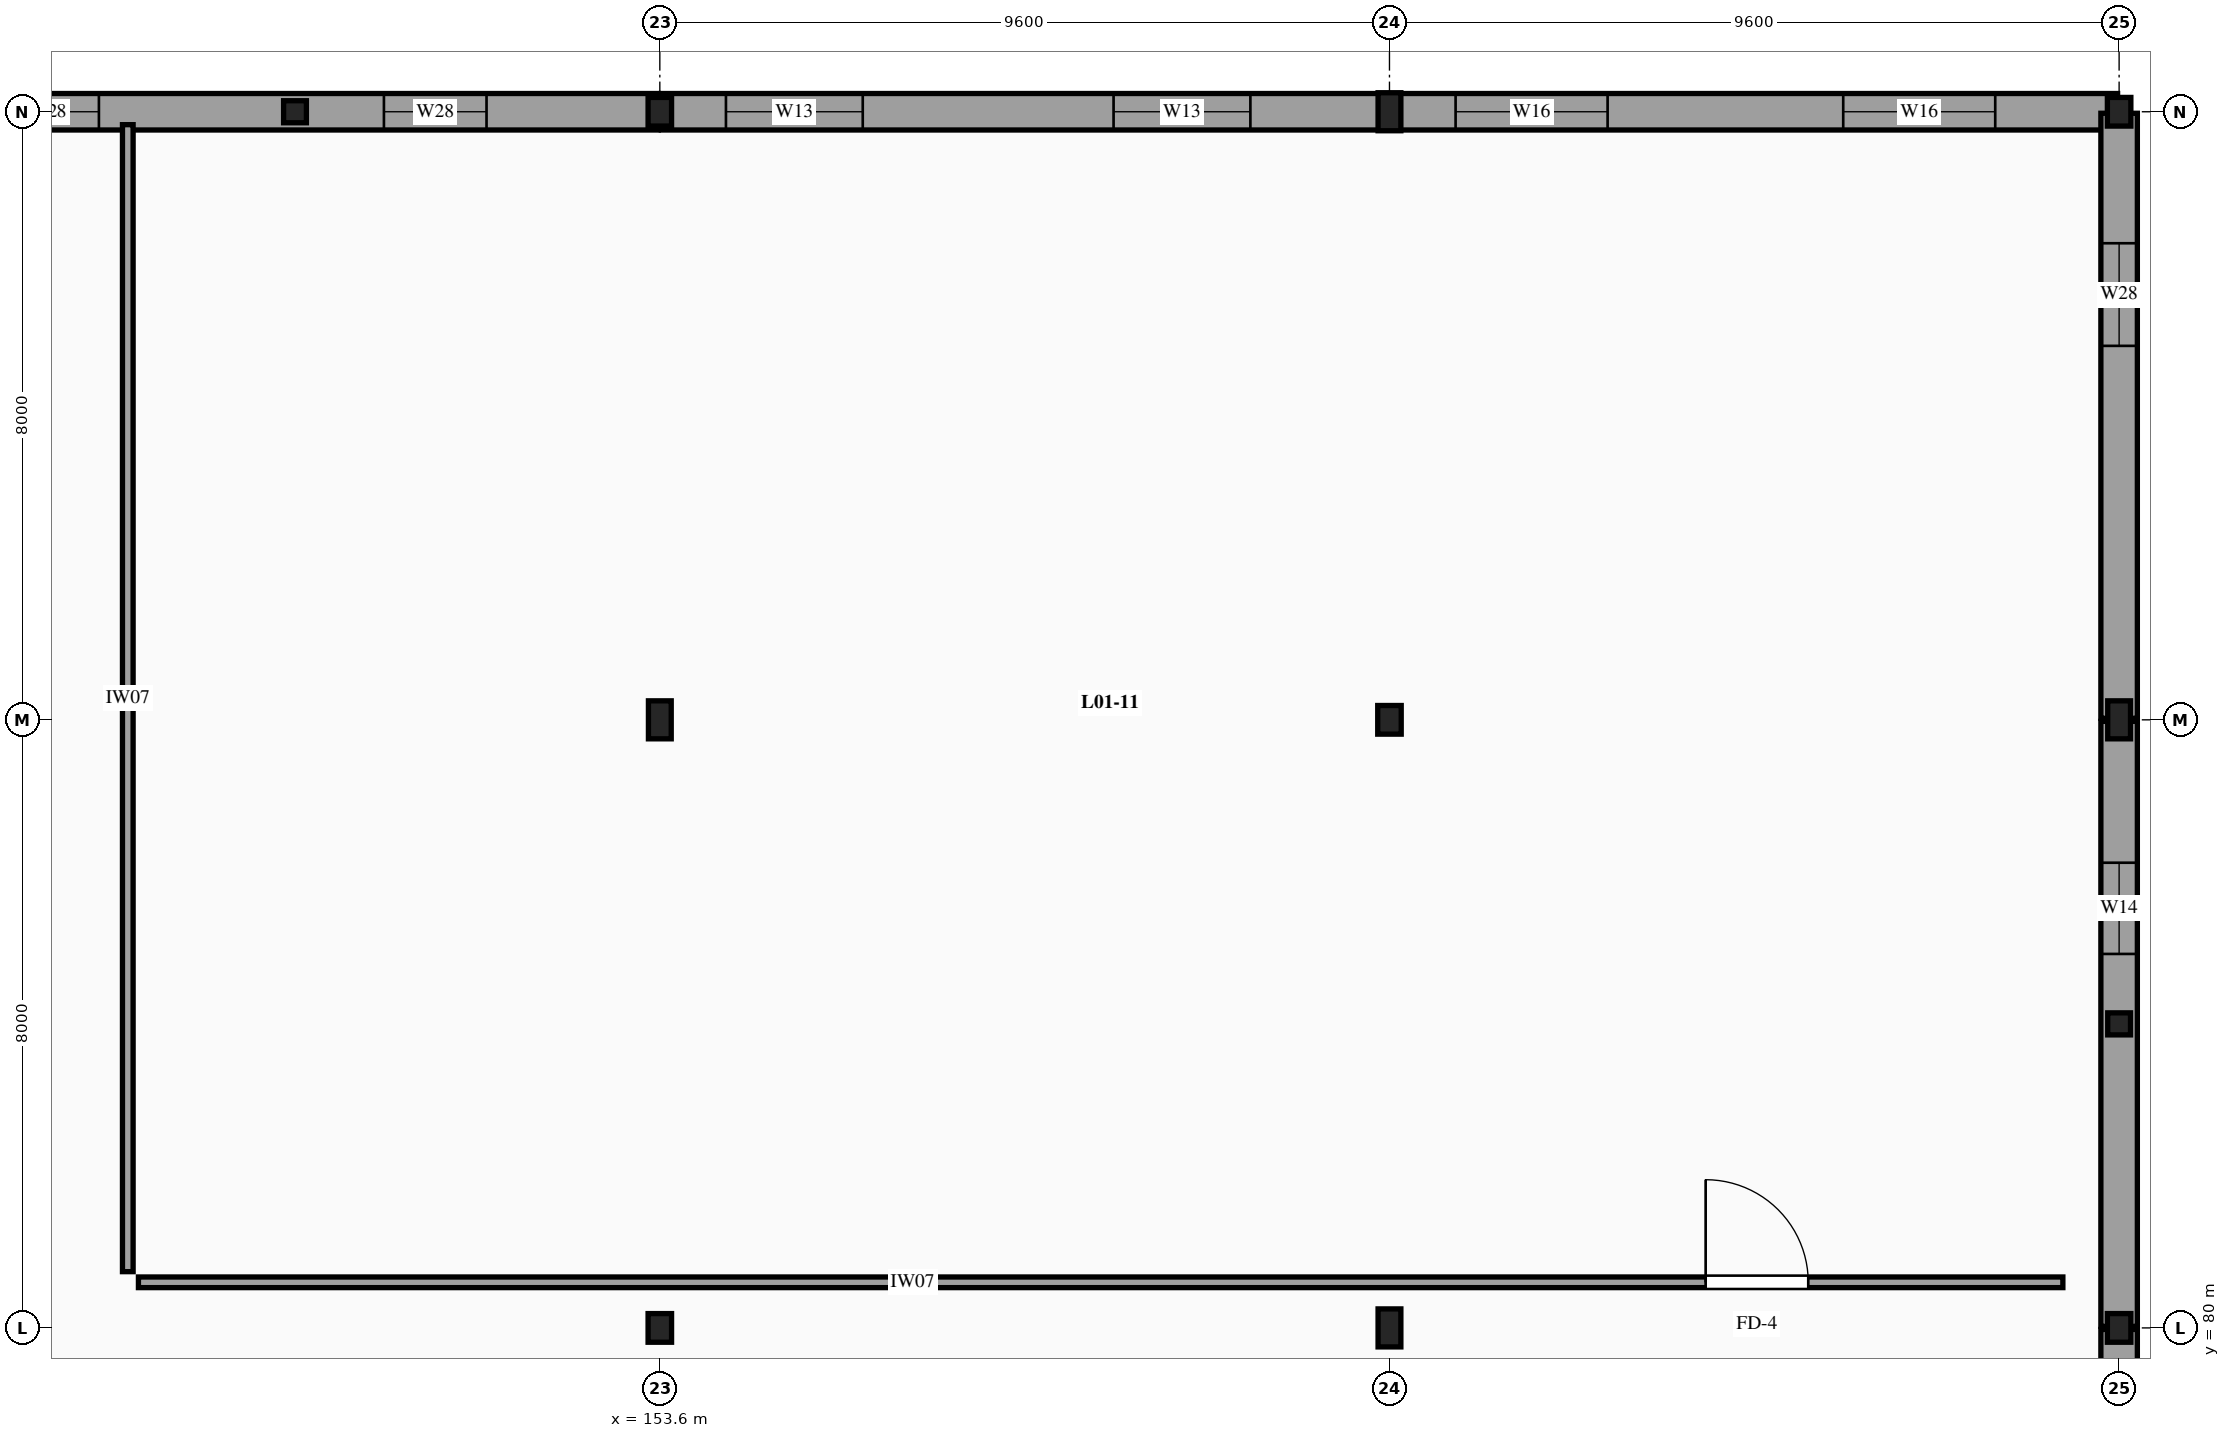
"""IFC4 building model, lengths in metres.
Left out: names, types, materials, properties, quantities, classifications, styles, units other than length and angle.
Written with IfcOpenShell. Run it as: python <this file> out.ifc"""

import sys

from ifc_helpers import new_model, si_unit, direction, frame, frame_2d, origin, origin_2d, place, context, subcontext, project, spatial, rectangle, i_section, extrude, element, fill, save


model = new_model("IFC4")
c1 = context("Model", 3, precision=1e-05, world=origin(), true_north=direction((0.0, 1.0)))
c2 = subcontext(c1, "Body", "Model", "MODEL_VIEW")
j1 = project(units=[si_unit("LENGTHUNIT", "METRE"), si_unit("PLANEANGLEUNIT", "RADIAN")], contexts=[c1])
p1 = place(None, origin())
s1 = spatial("IfcSite", under=j1, at=p1, CompositionType="ELEMENT")
p2 = place(p1, origin())
s2 = spatial("IfcBuilding", under=s1, at=p2, CompositionType="ELEMENT")
p3 = place(p2, frame((0.0, 0.0, 4.5)))
s3 = spatial("IfcBuildingStorey", under=s2, at=p3, CompositionType="ELEMENT", Elevation=4.5)
p4 = place(p3, frame((153.6, 80.0, -0.26), z_axis=(0.0, 0.0, 1.0), x_axis=(1.0, 0.0, 0.0)))
e1 = element("IfcColumn", 1, at=p4, inside=s3, PredefinedType="COLUMN", context=c2, shape_type="SweptSolid", body=[
    extrude(i_section(OverallWidth=0.309, OverallDepth=0.377, WebThickness=0.021, FlangeThickness=0.04, FilletRadius=0.027, at=origin_2d()), origin(), (0.0, 0.0, 1.0), 4.2),
])
p5 = place(p3, frame((153.6, 88.0, -0.26), z_axis=(0.0, 0.0, 1.0), x_axis=(1.0, 0.0, 0.0)))
e2 = element("IfcColumn", 2, at=p5, inside=s3, PredefinedType="COLUMN", context=c2, shape_type="SweptSolid", body=[
    extrude(i_section(OverallWidth=0.3, OverallDepth=0.5, WebThickness=0.014, FlangeThickness=0.028, FilletRadius=0.027, at=origin_2d()), origin(), (0.0, 0.0, 1.0), 4.2),
])
p6 = place(p3, frame((153.6, 96.0, -0.26), z_axis=(0.0, 0.0, 1.0), x_axis=(1.0, 0.0, 0.0)))
e3 = element("IfcColumn", 3, at=p6, inside=s3, PredefinedType="COLUMN", context=c2, shape_type="SweptSolid", body=[
    extrude(i_section(OverallWidth=0.309, OverallDepth=0.377, WebThickness=0.021, FlangeThickness=0.04, FilletRadius=0.027, at=origin_2d()), origin(), (0.0, 0.0, 1.0), 4.2),
])
p7 = place(p3, frame((163.2, 80.0, -0.26), z_axis=(0.0, 0.0, 1.0), x_axis=(1.0, 0.0, 0.0)))
e4 = element("IfcColumn", 4, at=p7, inside=s3, PredefinedType="COLUMN", context=c2, shape_type="SweptSolid", body=[
    extrude(i_section(OverallWidth=0.3, OverallDepth=0.5, WebThickness=0.014, FlangeThickness=0.028, FilletRadius=0.027, at=origin_2d()), origin(), (0.0, 0.0, 1.0), 4.2),
])
p8 = place(p3, frame((163.2, 88.0, -0.26), z_axis=(0.0, 0.0, 1.0), x_axis=(1.0, 0.0, 0.0)))
e5 = element("IfcColumn", 5, at=p8, inside=s3, PredefinedType="COLUMN", context=c2, shape_type="SweptSolid", body=[
    extrude(i_section(OverallWidth=0.309, OverallDepth=0.377, WebThickness=0.021, FlangeThickness=0.04, FilletRadius=0.027, at=origin_2d()), origin(), (0.0, 0.0, 1.0), 4.2),
])
p9 = place(p3, frame((163.2, 96.0, -0.26), z_axis=(0.0, 0.0, 1.0), x_axis=(1.0, 0.0, 0.0)))
e6 = element("IfcColumn", 6, at=p9, inside=s3, PredefinedType="COLUMN", context=c2, shape_type="SweptSolid", body=[
    extrude(i_section(OverallWidth=0.3, OverallDepth=0.5, WebThickness=0.014, FlangeThickness=0.028, FilletRadius=0.027, at=origin_2d()), origin(), (0.0, 0.0, 1.0), 4.2),
])
p10 = place(p3, frame((172.8, 80.0, -0.26), z_axis=(0.0, 0.0, 1.0), x_axis=(1.0, 0.0, 0.0)))
e7 = element("IfcColumn", 7, at=p10, inside=s3, PredefinedType="COLUMN", context=c2, shape_type="SweptSolid", body=[
    extrude(i_section(OverallWidth=0.309, OverallDepth=0.377, WebThickness=0.021, FlangeThickness=0.04, FilletRadius=0.027, at=origin_2d()), origin(), (0.0, 0.0, 1.0), 4.2),
])
p11 = place(p3, frame((172.8, 88.0, -0.26), z_axis=(0.0, 0.0, 1.0), x_axis=(1.0, 0.0, 0.0)))
e8 = element("IfcColumn", 8, at=p11, inside=s3, PredefinedType="COLUMN", context=c2, shape_type="SweptSolid", body=[
    extrude(i_section(OverallWidth=0.3, OverallDepth=0.5, WebThickness=0.014, FlangeThickness=0.028, FilletRadius=0.027, at=origin_2d()), origin(), (0.0, 0.0, 1.0), 4.2),
])
p12 = place(p3, frame((172.8, 96.0, -0.26), z_axis=(0.0, 0.0, 1.0), x_axis=(1.0, 0.0, 0.0)))
e9 = element("IfcColumn", 9, at=p12, inside=s3, PredefinedType="COLUMN", context=c2, shape_type="SweptSolid", body=[
    extrude(i_section(OverallWidth=0.309, OverallDepth=0.377, WebThickness=0.021, FlangeThickness=0.04, FilletRadius=0.027, at=origin_2d()), origin(), (0.0, 0.0, 1.0), 4.2),
])
for number, where, z_axis, x_axis in (
    (10, (172.8, 84.0, -0.26), (0.0, 0.0, 1.0), (1.0, 0.0, 0.0)),
    (11, (148.8, 96.0, -0.26), (0.0, 0.0, 1.0), (1.0, 0.0, 0.0)),
):
    element("IfcColumn", number, at=place(p3, frame(where, z_axis=z_axis, x_axis=x_axis)), inside=s3, PredefinedType="PILASTER", context=c2, shape_type="SweptSolid", body=[
        extrude(i_section(OverallWidth=0.3, OverallDepth=0.29, WebThickness=0.009, FlangeThickness=0.014, FilletRadius=0.027, at=origin_2d()), origin(), (0.0, 0.0, 1.0), 4.2),
    ])
p13 = place(p3, frame((144.02, 96.0, 0.0), z_axis=(0.0, 0.0, 1.0), x_axis=(1.0, 0.0, 0.0)))
e12 = element("IfcWall", 12, at=p13, inside=s3, PredefinedType="SOLIDWALL", context=c2, shape_type="SweptSolid", body=[
    extrude(rectangle(XDim=9.56, YDim=0.48, at=frame_2d((4.78, 0.0))), origin(), (0.0, 0.0, 1.0), 3.26),
])
p14 = place(p13, frame((0.85, 0.0, 0.85)))
e13 = element("IfcOpeningElement", 13, at=p14, cuts=e12, PredefinedType="OPENING", context=c2, shape_type="SweptSolid", body=[
    extrude(rectangle(XDim=1.35, YDim=1.7, at=frame_2d((0.675, 0.85))), frame((0.0, 0.25, 0.0), z_axis=(0.0, -1.0, 0.0), x_axis=(1.0, 0.0, 0.0)), (0.0, 0.0, 1.0), 0.5),
])
p15 = place(p13, frame((5.95, 0.0, 0.85)))
e14 = element("IfcOpeningElement", 14, at=p15, cuts=e12, PredefinedType="OPENING", context=c2, shape_type="SweptSolid", body=[
    extrude(rectangle(XDim=1.35, YDim=1.7, at=frame_2d((0.675, 0.85))), frame((0.0, 0.25, 0.0), z_axis=(0.0, -1.0, 0.0), x_axis=(1.0, 0.0, 0.0)), (0.0, 0.0, 1.0), 0.5),
])
p16 = place(p3, frame((153.62, 96.0, 0.0), z_axis=(0.0, 0.0, 1.0), x_axis=(1.0, 0.0, 0.0)))
e15 = element("IfcWall", 15, at=p16, inside=s3, PredefinedType="SOLIDWALL", context=c2, shape_type="SweptSolid", body=[
    extrude(rectangle(XDim=9.56, YDim=0.48, at=frame_2d((4.78, 0.0))), origin(), (0.0, 0.0, 1.0), 3.26),
])
p17 = place(p16, frame((0.85, 0.0, 0.72)))
e16 = element("IfcOpeningElement", 16, at=p17, cuts=e15, PredefinedType="OPENING", context=c2, shape_type="SweptSolid", body=[
    extrude(rectangle(XDim=1.8, YDim=1.6, at=frame_2d((0.9, 0.8))), frame((0.0, 0.25, 0.0), z_axis=(0.0, -1.0, 0.0), x_axis=(1.0, 0.0, 0.0)), (0.0, 0.0, 1.0), 0.5),
])
p18 = place(p16, frame((5.95, 0.0, 0.72)))
e17 = element("IfcOpeningElement", 17, at=p18, cuts=e15, PredefinedType="OPENING", context=c2, shape_type="SweptSolid", body=[
    extrude(rectangle(XDim=1.8, YDim=1.6, at=frame_2d((0.9, 0.8))), frame((0.0, 0.25, 0.0), z_axis=(0.0, -1.0, 0.0), x_axis=(1.0, 0.0, 0.0)), (0.0, 0.0, 1.0), 0.5),
])
p19 = place(p3, frame((163.22, 96.0, 0.0), z_axis=(0.0, 0.0, 1.0), x_axis=(1.0, 0.0, 0.0)))
e18 = element("IfcWall", 18, at=p19, inside=s3, PredefinedType="SOLIDWALL", context=c2, shape_type="SweptSolid", body=[
    extrude(rectangle(XDim=9.56, YDim=0.48, at=frame_2d((4.78, 0.0))), origin(), (0.0, 0.0, 1.0), 3.26),
])
p20 = place(p19, frame((0.85, 0.0, 0.72)))
e19 = element("IfcOpeningElement", 19, at=p20, cuts=e18, PredefinedType="OPENING", context=c2, shape_type="SweptSolid", body=[
    extrude(rectangle(XDim=2.0, YDim=2.2, at=frame_2d((1.0, 1.1))), frame((0.0, 0.25, 0.0), z_axis=(0.0, -1.0, 0.0), x_axis=(1.0, 0.0, 0.0)), (0.0, 0.0, 1.0), 0.5),
])
p21 = place(p19, frame((5.95, 0.0, 0.72)))
e20 = element("IfcOpeningElement", 20, at=p21, cuts=e18, PredefinedType="OPENING", context=c2, shape_type="SweptSolid", body=[
    extrude(rectangle(XDim=2.0, YDim=2.2, at=frame_2d((1.0, 1.1))), frame((0.0, 0.25, 0.0), z_axis=(0.0, -1.0, 0.0), x_axis=(1.0, 0.0, 0.0)), (0.0, 0.0, 1.0), 0.5),
])
p22 = place(p3, frame((172.8, 72.02, 0.0), z_axis=(0.0, 0.0, 1.0), x_axis=(0.0, 1.0, 0.0)))
e21 = element("IfcWall", 21, at=p22, inside=s3, PredefinedType="SOLIDWALL", context=c2, shape_type="SweptSolid", body=[
    extrude(rectangle(XDim=7.96, YDim=0.48, at=frame_2d((3.98, 0.0))), origin(), (0.0, 0.0, 1.0), 3.26),
])
p23 = place(p22, frame((4.9, 0.0, 0.9)))
e22 = element("IfcOpeningElement", 22, at=p23, cuts=e21, PredefinedType="OPENING", context=c2, shape_type="SweptSolid", body=[
    extrude(rectangle(XDim=1.2, YDim=2.0, at=frame_2d((0.6, 1.0))), frame((0.0, 0.25, 0.0), z_axis=(0.0, -1.0, 0.0), x_axis=(1.0, 0.0, 0.0)), (0.0, 0.0, 1.0), 0.5),
])
p24 = place(p3, frame((172.8, 80.02, 0.0), z_axis=(0.0, 0.0, 1.0), x_axis=(0.0, 1.0, 0.0)))
e23 = element("IfcWall", 23, at=p24, inside=s3, PredefinedType="SOLIDWALL", context=c2, shape_type="SweptSolid", body=[
    extrude(rectangle(XDim=7.96, YDim=0.48, at=frame_2d((3.98, 0.0))), origin(), (0.0, 0.0, 1.0), 3.26),
])
p25 = place(p24, frame((4.9, 0.0, 0.9)))
e24 = element("IfcOpeningElement", 24, at=p25, cuts=e23, PredefinedType="OPENING", context=c2, shape_type="SweptSolid", body=[
    extrude(rectangle(XDim=1.2, YDim=1.8, at=frame_2d((0.6, 0.9))), frame((0.0, 0.25, 0.0), z_axis=(0.0, -1.0, 0.0), x_axis=(1.0, 0.0, 0.0)), (0.0, 0.0, 1.0), 0.5),
])
p26 = place(p3, frame((172.8, 88.02, 0.0), z_axis=(0.0, 0.0, 1.0), x_axis=(0.0, 1.0, 0.0)))
e25 = element("IfcWall", 25, at=p26, inside=s3, PredefinedType="SOLIDWALL", context=c2, shape_type="SweptSolid", body=[
    extrude(rectangle(XDim=7.96, YDim=0.48, at=frame_2d((3.98, 0.0))), origin(), (0.0, 0.0, 1.0), 3.26),
])
p27 = place(p26, frame((4.9, 0.0, 0.9)))
e26 = element("IfcOpeningElement", 26, at=p27, cuts=e25, PredefinedType="OPENING", context=c2, shape_type="SweptSolid", body=[
    extrude(rectangle(XDim=1.35, YDim=1.7, at=frame_2d((0.675, 0.85))), frame((0.0, 0.25, 0.0), z_axis=(0.0, -1.0, 0.0), x_axis=(1.0, 0.0, 0.0)), (0.0, 0.0, 1.0), 0.5),
])
p28 = place(p3, frame((146.74, 80.6, 0.0), z_axis=(0.0, 0.0, 1.0), x_axis=(1.0, 0.0, 0.0)))
e27 = element("IfcWall", 27, at=p28, inside=s3, PredefinedType="PARTITIONING", context=c2, shape_type="SweptSolid", body=[
    extrude(rectangle(XDim=25.32, YDim=0.14, at=frame_2d((12.66, 0.0))), origin(), (0.0, 0.0, 1.0), 3.1),
])
p29 = place(p28, frame((20.62, 0.0, 0.0)))
e28 = element("IfcOpeningElement", 28, at=p29, cuts=e27, PredefinedType="OPENING", context=c2, shape_type="SweptSolid", body=[
    extrude(rectangle(XDim=1.35, YDim=2.2, at=frame_2d((0.675, 1.1))), frame((0.0, 0.08, 0.0), z_axis=(0.0, -1.0, 0.0), x_axis=(1.0, 0.0, 0.0)), (0.0, 0.0, 1.0), 0.16),
])
p30 = place(p3, frame((146.6, 80.74, 0.0), z_axis=(0.0, 0.0, 1.0), x_axis=(0.0, 1.0, 0.0)))
e29 = element("IfcWall", 29, at=p30, inside=s3, PredefinedType="PARTITIONING", context=c2, shape_type="SweptSolid", body=[
    extrude(rectangle(XDim=15.09, YDim=0.14, at=frame_2d((7.545, 0.0))), origin(), (0.0, 0.0, 1.0), 3.1),
])
p31 = place(p14, origin())
e30 = element("IfcWindow", 30, at=p31, inside=s3, PartitioningType="SINGLE_PANEL", PredefinedType="WINDOW", context=c2, shape_type="SweptSolid", body=[
    extrude(rectangle(XDim=1.35, YDim=1.7, at=frame_2d((0.675, 0.85))), frame((0.0, 0.03, 0.0), z_axis=(0.0, -1.0, 0.0), x_axis=(1.0, 0.0, 0.0)), (0.0, 0.0, 1.0), 0.06),
])
fill(e13, e30)
p32 = place(p15, origin())
e31 = element("IfcWindow", 31, at=p32, inside=s3, PartitioningType="SINGLE_PANEL", PredefinedType="WINDOW", context=c2, shape_type="SweptSolid", body=[
    extrude(rectangle(XDim=1.35, YDim=1.7, at=frame_2d((0.675, 0.85))), frame((0.0, 0.03, 0.0), z_axis=(0.0, -1.0, 0.0), x_axis=(1.0, 0.0, 0.0)), (0.0, 0.0, 1.0), 0.06),
])
fill(e14, e31)
p33 = place(p17, origin())
e32 = element("IfcWindow", 32, at=p33, inside=s3, PartitioningType="SINGLE_PANEL", PredefinedType="WINDOW", context=c2, shape_type="SweptSolid", body=[
    extrude(rectangle(XDim=1.8, YDim=1.6, at=frame_2d((0.9, 0.8))), frame((0.0, 0.03, 0.0), z_axis=(0.0, -1.0, 0.0), x_axis=(1.0, 0.0, 0.0)), (0.0, 0.0, 1.0), 0.06),
])
fill(e16, e32)
p34 = place(p18, origin())
e33 = element("IfcWindow", 33, at=p34, inside=s3, PartitioningType="SINGLE_PANEL", PredefinedType="WINDOW", context=c2, shape_type="SweptSolid", body=[
    extrude(rectangle(XDim=1.8, YDim=1.6, at=frame_2d((0.9, 0.8))), frame((0.0, 0.03, 0.0), z_axis=(0.0, -1.0, 0.0), x_axis=(1.0, 0.0, 0.0)), (0.0, 0.0, 1.0), 0.06),
])
fill(e17, e33)
p35 = place(p20, origin())
e34 = element("IfcWindow", 34, at=p35, inside=s3, PartitioningType="SINGLE_PANEL", PredefinedType="WINDOW", context=c2, shape_type="SweptSolid", body=[
    extrude(rectangle(XDim=2.0, YDim=2.2, at=frame_2d((1.0, 1.1))), frame((0.0, 0.03, 0.0), z_axis=(0.0, -1.0, 0.0), x_axis=(1.0, 0.0, 0.0)), (0.0, 0.0, 1.0), 0.06),
])
fill(e19, e34)
p36 = place(p21, origin())
e35 = element("IfcWindow", 35, at=p36, inside=s3, PartitioningType="SINGLE_PANEL", PredefinedType="WINDOW", context=c2, shape_type="SweptSolid", body=[
    extrude(rectangle(XDim=2.0, YDim=2.2, at=frame_2d((1.0, 1.1))), frame((0.0, 0.03, 0.0), z_axis=(0.0, -1.0, 0.0), x_axis=(1.0, 0.0, 0.0)), (0.0, 0.0, 1.0), 0.06),
])
fill(e20, e35)
p37 = place(p25, origin())
e36 = element("IfcWindow", 36, at=p37, inside=s3, PartitioningType="SINGLE_PANEL", PredefinedType="WINDOW", context=c2, shape_type="SweptSolid", body=[
    extrude(rectangle(XDim=1.2, YDim=1.8, at=frame_2d((0.6, 0.9))), frame((0.0, 0.03, 0.0), z_axis=(0.0, -1.0, 0.0), x_axis=(1.0, 0.0, 0.0)), (0.0, 0.0, 1.0), 0.06),
])
fill(e24, e36)
p38 = place(p27, origin())
e37 = element("IfcWindow", 37, at=p38, inside=s3, PartitioningType="SINGLE_PANEL", PredefinedType="WINDOW", context=c2, shape_type="SweptSolid", body=[
    extrude(rectangle(XDim=1.35, YDim=1.7, at=frame_2d((0.675, 0.85))), frame((0.0, 0.03, 0.0), z_axis=(0.0, -1.0, 0.0), x_axis=(1.0, 0.0, 0.0)), (0.0, 0.0, 1.0), 0.06),
])
fill(e26, e37)
p39 = place(p29, origin())
e38 = element("IfcDoor", 38, at=p39, inside=s3, OperationType="SINGLE_SWING_LEFT", PredefinedType="DOOR", context=c2, shape_type="SweptSolid", body=[
    extrude(rectangle(XDim=1.35, YDim=2.2, at=frame_2d((0.675, 1.1))), frame((0.0, 0.025, 0.0), z_axis=(0.0, -1.0, 0.0), x_axis=(1.0, 0.0, 0.0)), (0.0, 0.0, 1.0), 0.05),
])
fill(e28, e38)
save(model, sys.argv[1])
